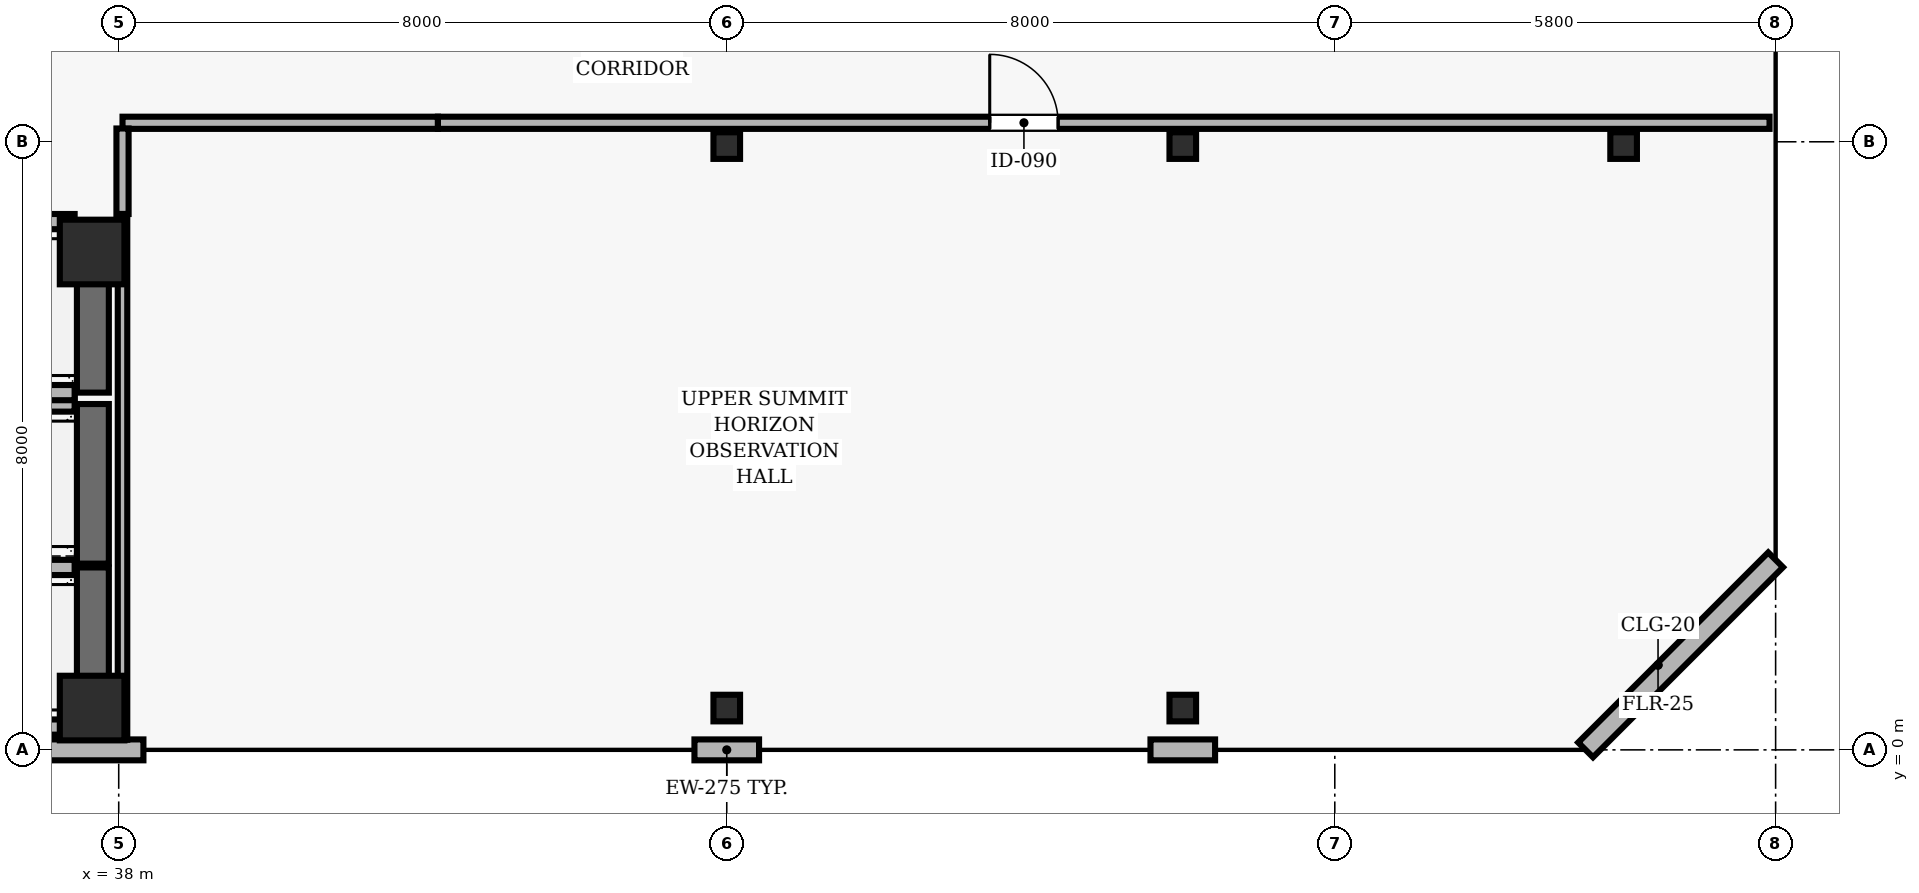
"""IFC4 building model, lengths in metres.
Left out: names, types, materials, properties, quantities, classifications, styles, units other than length and angle.
Written with IfcOpenShell. Run it as: python <this file> out.ifc"""

import sys

from ifc_helpers import new_model, si_unit, direction, frame, frame_2d, origin, origin_2d, place, context, subcontext, project, spatial, rectangle, hollow_rectangle, extrude, element, fill, save


model = new_model("IFC4")
c1 = context("Model", 3, precision=1e-05, world=origin(), true_north=direction((0.0, 1.0)))
c2 = subcontext(c1, "Body", "Model", "MODEL_VIEW")
j1 = project(units=[si_unit("LENGTHUNIT", "METRE"), si_unit("PLANEANGLEUNIT", "RADIAN")], contexts=[c1])
p1 = place(None, origin())
s1 = spatial("IfcSite", under=j1, at=p1, CompositionType="ELEMENT")
p2 = place(p1, origin())
s2 = spatial("IfcBuilding", under=s1, at=p2, CompositionType="ELEMENT")
p3 = place(p2, frame((0.0, 0.0, 311.7)))
s3 = spatial("IfcBuildingStorey", under=s2, at=p3, CompositionType="ELEMENT", Elevation=311.7)
for number, where, z_axis, x_axis in (
    (1, (37.65, 0.55, 0.0), (0.0, 0.0, 1.0), (1.0, 0.0, 0.0)),
    (2, (37.65, 6.55, 0.0), (0.0, 0.0, 1.0), (1.0, 0.0, 0.0)),
):
    element("IfcColumn", number, at=place(p3, frame(where, z_axis=z_axis, x_axis=x_axis)), inside=s3, PredefinedType="COLUMN", context=c2, shape_type="SweptSolid", body=[
        extrude(rectangle(XDim=0.85, YDim=0.85, at=origin_2d()), origin(), (0.0, 0.0, 1.0), 5.0),
    ])
for number, where, z_axis, x_axis in (
    (3, (46.0, 0.55, 0.0), (0.0, 0.0, 1.0), (1.0, 0.0, 0.0)),
    (4, (46.0, 7.95, 0.0), (0.0, 0.0, 1.0), (1.0, 0.0, 0.0)),
    (5, (52.0, 0.55, 0.0), (0.0, 0.0, 1.0), (1.0, 0.0, 0.0)),
    (6, (52.0, 7.95, 0.0), (0.0, 0.0, 1.0), (1.0, 0.0, 0.0)),
    (7, (57.8, 7.95, 0.0), (0.0, 0.0, 1.0), (1.0, 0.0, 0.0)),
):
    element("IfcColumn", number, at=place(p3, frame(where, z_axis=z_axis, x_axis=x_axis)), inside=s3, PredefinedType="COLUMN", context=c2, shape_type="SweptSolid", body=[
        extrude(hollow_rectangle(XDim=0.35, YDim=0.35, WallThickness=0.016, at=origin_2d()), origin(), (0.0, 0.0, 1.0), 5.0),
    ])
p4 = place(p3, frame((36.975, 0.0, 0.0), z_axis=(0.0, 0.0, 1.0), x_axis=(1.0, 0.0, 0.0)))
e8 = element("IfcWall", 8, at=p4, inside=s3, PredefinedType="SOLIDWALL", context=c2, shape_type="SweptSolid", body=[
    extrude(rectangle(XDim=1.35, YDim=0.275, at=frame_2d((0.675, 0.0))), origin(), (0.0, 0.0, 1.0), 4.74),
])
for number, where, z_axis, x_axis in (
    (9, (45.575, 0.0, 0.0), (0.0, 0.0, 1.0), (1.0, 0.0, 0.0)),
    (10, (51.575, 0.0, 0.0), (0.0, 0.0, 1.0), (1.0, 0.0, 0.0)),
):
    element("IfcWall", number, at=place(p3, frame(where, z_axis=z_axis, x_axis=x_axis)), inside=s3, PredefinedType="SOLIDWALL", context=c2, shape_type="SweptSolid", body=[
        extrude(rectangle(XDim=0.85, YDim=0.275, at=frame_2d((0.425, 0.0))), origin(), (0.0, 0.0, 1.0), 4.74),
    ])
p5 = place(p3, frame((57.3, 0.0, 0.0), z_axis=(0.0, 0.0, 1.0), x_axis=(0.707106781187, 0.707106781187, 0.0)))
e11 = element("IfcWall", 11, at=p5, inside=s3, PredefinedType="SOLIDWALL", context=c2, shape_type="SweptSolid", body=[
    extrude(rectangle(XDim=3.536, YDim=0.275, at=frame_2d((1.768, 0.0))), origin(), (0.0, 0.0, 1.0), 4.74),
])
p6 = place(p3, frame((37.66, 0.3, 0.0), z_axis=(0.0, 0.0, 1.0), x_axis=(0.0, 1.0, 0.0)))
e12 = element("IfcWall", 12, at=p6, inside=s3, PredefinedType="SHEAR", context=c2, shape_type="SweptSolid", body=[
    extrude(rectangle(XDim=2.1, YDim=0.42, at=frame_2d((1.05, 0.0))), origin(), (0.0, 0.0, 1.0), 4.74),
])
for number, where, z_axis, x_axis in (
    (13, (35.28, 0.3, 0.0), (0.0, 0.0, 1.0), (1.0, 0.0, 0.0)),
    (14, (37.42, 2.4, 0.0), (0.0, 0.0, 1.0), (-1.0, 0.0, 0.0)),
):
    element("IfcWall", number, at=place(p3, frame(where, z_axis=z_axis, x_axis=x_axis)), inside=s3, PredefinedType="SOLIDWALL", context=c2, shape_type="SweptSolid", body=[
        extrude(rectangle(XDim=2.14, YDim=0.2, at=frame_2d((1.07, 0.0))), origin(), (0.0, 0.0, 1.0), 4.74),
    ])
p7 = place(p3, frame((37.66, 2.45, 0.0), z_axis=(0.0, 0.0, 1.0), x_axis=(0.0, 1.0, 0.0)))
e15 = element("IfcWall", 15, at=p7, inside=s3, PredefinedType="SHEAR", context=c2, shape_type="SweptSolid", body=[
    extrude(rectangle(XDim=2.1, YDim=0.42, at=frame_2d((1.05, 0.0))), origin(), (0.0, 0.0, 1.0), 4.74),
])
p8 = place(p3, frame((37.42, 4.55, 0.0), z_axis=(0.0, 0.0, 1.0), x_axis=(-1.0, 0.0, 0.0)))
e16 = element("IfcWall", 16, at=p8, inside=s3, PredefinedType="SOLIDWALL", context=c2, shape_type="SweptSolid", body=[
    extrude(rectangle(XDim=2.14, YDim=0.2, at=frame_2d((1.07, 0.0))), origin(), (0.0, 0.0, 1.0), 4.74),
])
p9 = place(p3, frame((37.66, 4.7, 0.0), z_axis=(0.0, 0.0, 1.0), x_axis=(0.0, 1.0, 0.0)))
e17 = element("IfcWall", 17, at=p9, inside=s3, PredefinedType="SHEAR", context=c2, shape_type="SweptSolid", body=[
    extrude(rectangle(XDim=2.25, YDim=0.42, at=frame_2d((1.125, 0.0))), origin(), (0.0, 0.0, 1.0), 4.74),
])
for number, where, z_axis, x_axis in (
    (18, (35.28, 4.7, 0.0), (0.0, 0.0, 1.0), (1.0, 0.0, 0.0)),
    (19, (37.42, 6.95, 0.0), (0.0, 0.0, 1.0), (-1.0, 0.0, 0.0)),
):
    element("IfcWall", number, at=place(p3, frame(where, z_axis=z_axis, x_axis=x_axis)), inside=s3, PredefinedType="SOLIDWALL", context=c2, shape_type="SweptSolid", body=[
        extrude(rectangle(XDim=2.14, YDim=0.2, at=frame_2d((1.07, 0.0))), origin(), (0.0, 0.0, 1.0), 4.74),
    ])
p10 = place(p3, frame((38.05, 8.25, 0.0), z_axis=(0.0, 0.0, 1.0), x_axis=(1.0, 0.0, 0.0)))
e20 = element("IfcWall", 20, at=p10, inside=s3, PredefinedType="PARTITIONING", context=c2, shape_type="SweptSolid", body=[
    extrude(rectangle(XDim=4.15, YDim=0.16, at=frame_2d((2.075, 0.0))), origin(), (0.0, 0.0, 1.0), 4.271),
])
p11 = place(p3, frame((42.2, 8.25, 0.0), z_axis=(0.0, 0.0, 1.0), x_axis=(1.0, 0.0, 0.0)))
e21 = element("IfcWall", 21, at=p11, inside=s3, PredefinedType="PARTITIONING", context=c2, shape_type="SweptSolid", body=[
    extrude(rectangle(XDim=17.52, YDim=0.16, at=frame_2d((8.76, 0.0))), origin(), (0.0, 0.0, 1.0), 4.271),
])
p12 = place(p11, frame((7.26, 0.0, 0.0)))
e22 = element("IfcOpeningElement", 22, at=p12, cuts=e21, PredefinedType="OPENING", context=c2, shape_type="SweptSolid", body=[
    extrude(rectangle(XDim=0.9, YDim=2.1, at=frame_2d((0.45, 1.05))), frame((0.0, 0.09, 0.0), z_axis=(0.0, -1.0, 0.0), x_axis=(1.0, 0.0, 0.0)), (0.0, 0.0, 1.0), 0.18),
])
p13 = place(p3, frame((38.05, 7.05, 0.0), z_axis=(0.0, 0.0, 1.0), x_axis=(0.0, 1.0, 0.0)))
e23 = element("IfcWall", 23, at=p13, inside=s3, PredefinedType="PARTITIONING", context=c2, shape_type="SweptSolid", body=[
    extrude(rectangle(XDim=1.125, YDim=0.16, at=frame_2d((0.562, 0.0))), origin(), (0.0, 0.0, 1.0), 4.271),
])
p14 = place(p3, frame((38.05, 7.05, 0.0), z_axis=(0.0, 0.0, 1.0), x_axis=(0.0, -1.0, 0.0)))
e24 = element("IfcWall", 24, at=p14, inside=s3, PredefinedType="PARTITIONING", context=c2, shape_type="SweptSolid", body=[
    extrude(rectangle(XDim=6.917, YDim=0.125, at=frame_2d((3.458, 0.0))), origin(), (0.0, 0.0, 1.0), 4.271),
])
p15 = place(p12, origin())
e25 = element("IfcDoor", 25, at=p15, inside=s3, OperationType="SINGLE_SWING_LEFT", PredefinedType="DOOR", context=c2, shape_type="SweptSolid", body=[
    extrude(rectangle(XDim=0.9, YDim=2.1, at=frame_2d((0.45, 1.05))), frame((0.0, 0.025, 0.0), z_axis=(0.0, -1.0, 0.0), x_axis=(1.0, 0.0, 0.0)), (0.0, 0.0, 1.0), 0.05),
])
fill(e22, e25)
save(model, sys.argv[1])
